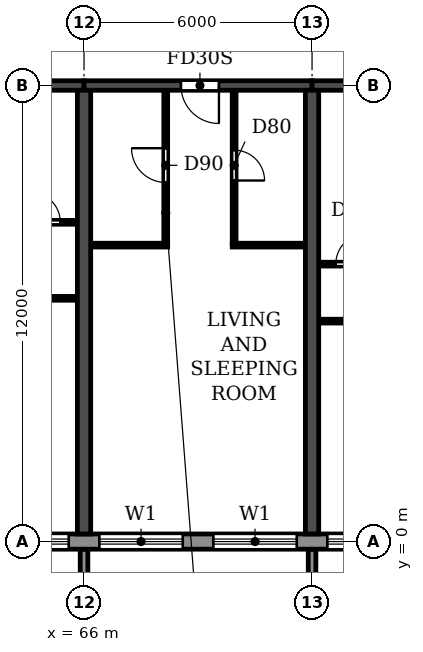
"""IFC4 building model, lengths in metres.
Left out: names, types, materials, properties, quantities, classifications, styles, units other than length and angle.
Written with IfcOpenShell. Run it as: python <this file> out.ifc"""

import sys

from ifc_helpers import new_model, si_unit, direction, frame, frame_2d, origin, place, context, subcontext, project, spatial, polyline, rectangle, outline, extrude, source, transform, mapped, element, fill, save


model = new_model("IFC4")
c1 = context("Model", 3, precision=1e-05, world=origin(), true_north=direction((0.0, 1.0)))
c2 = subcontext(c1, "Body", "Model", "MODEL_VIEW")
j1 = project(units=[si_unit("LENGTHUNIT", "METRE"), si_unit("PLANEANGLEUNIT", "RADIAN")], contexts=[c1])
p1 = place(None, origin())
s1 = spatial("IfcSite", under=j1, at=p1, CompositionType="ELEMENT")
p2 = place(p1, origin())
s2 = spatial("IfcBuilding", under=s1, at=p2, CompositionType="ELEMENT")
p3 = place(p2, frame((0.0, 0.0, 72.9)))
s3 = spatial("IfcBuildingStorey", under=s2, at=p3, CompositionType="ELEMENT", Elevation=72.9)
for number, where, z_axis, x_axis in (
    (1, (66.0, 0.2, 0.0), (0.0, 0.0, 1.0), (0.0, 1.0, 0.0)),
    (2, (72.0, 0.2, 0.0), (0.0, 0.0, 1.0), (0.0, 1.0, 0.0)),
):
    element("IfcWall", number, at=place(p3, frame(where, z_axis=z_axis, x_axis=x_axis)), inside=s3, PredefinedType="SHEAR", context=c2, shape_type="SweptSolid", body=[
        extrude(rectangle(XDim=11.675, YDim=0.35, at=frame_2d((5.837, 0.0))), origin(), (0.0, 0.0, 1.0), 3.06),
    ])
p4 = place(p3, frame((60.0, 12.0, 0.0), z_axis=(0.0, 0.0, 1.0), x_axis=(1.0, 0.0, 0.0)))
e3 = element("IfcWall", 3, at=p4, inside=s3, PredefinedType="SHEAR", context=c2, shape_type="SweptSolid", body=[
    extrude(rectangle(XDim=6.0, YDim=0.25, at=frame_2d((3.0, 0.0))), origin(), (0.0, 0.0, 1.0), 2.46),
])
p5 = place(p4, frame((2.55, 0.0, 0.0)))
e4 = element("IfcOpeningElement", 4, at=p5, cuts=e3, PredefinedType="OPENING", context=c2, shape_type="SweptSolid", body=[
    extrude(rectangle(XDim=1.0, YDim=2.1, at=frame_2d((0.5, 1.05))), frame((0.0, 0.135, 0.0), z_axis=(0.0, -1.0, 0.0), x_axis=(1.0, 0.0, 0.0)), (0.0, 0.0, 1.0), 0.27),
])
p6 = place(p3, frame((66.0, 12.0, 0.0), z_axis=(0.0, 0.0, 1.0), x_axis=(1.0, 0.0, 0.0)))
e5 = element("IfcWall", 5, at=p6, inside=s3, PredefinedType="SHEAR", context=c2, shape_type="SweptSolid", body=[
    extrude(rectangle(XDim=6.0, YDim=0.25, at=frame_2d((3.0, 0.0))), origin(), (0.0, 0.0, 1.0), 2.46),
])
p7 = place(p6, frame((2.55, 0.0, 0.0)))
e6 = element("IfcOpeningElement", 6, at=p7, cuts=e5, PredefinedType="OPENING", context=c2, shape_type="SweptSolid", body=[
    extrude(rectangle(XDim=1.0, YDim=2.1, at=frame_2d((0.5, 1.05))), frame((0.0, 0.135, 0.0), z_axis=(0.0, -1.0, 0.0), x_axis=(1.0, 0.0, 0.0)), (0.0, 0.0, 1.0), 0.27),
])
p8 = place(p3, frame((72.0, 12.0, 0.0), z_axis=(0.0, 0.0, 1.0), x_axis=(1.0, 0.0, 0.0)))
e7 = element("IfcWall", 7, at=p8, inside=s3, PredefinedType="SHEAR", context=c2, shape_type="SweptSolid", body=[
    extrude(rectangle(XDim=6.0, YDim=0.25, at=frame_2d((3.0, 0.0))), origin(), (0.0, 0.0, 1.0), 2.46),
])
p9 = place(p8, frame((2.45, 0.0, 0.0)))
e8 = element("IfcOpeningElement", 8, at=p9, cuts=e7, PredefinedType="OPENING", context=c2, shape_type="SweptSolid", body=[
    extrude(rectangle(XDim=1.0, YDim=2.1, at=frame_2d((0.5, 1.05))), frame((0.0, 0.135, 0.0), z_axis=(0.0, -1.0, 0.0), x_axis=(1.0, 0.0, 0.0)), (0.0, 0.0, 1.0), 0.27),
])
p10 = place(p3, frame((10.683, 0.0, 0.0), z_axis=(0.0, 0.0, 1.0), x_axis=(1.0, 0.0, 0.0)))
e9 = element("IfcWall", 9, at=p10, inside=s3, PredefinedType="STANDARD", context=c2, shape_type="SweptSolid", body=[
    extrude(rectangle(XDim=80.634, YDim=0.4, at=frame_2d((40.317, 0.0))), origin(), (0.0, 0.0, 1.0), 3.06),
])
p11 = place(p10, frame((1.717, 0.0, 0.9)))
e10 = element("IfcOpeningElement", 10, at=p11, cuts=e9, PredefinedType="OPENING", context=c2, shape_type="SweptSolid", body=[
    extrude(rectangle(XDim=2.2, YDim=1.5, at=frame_2d((1.1, 0.75))), frame((0.0, 0.21, 0.0), z_axis=(0.0, -1.0, 0.0), x_axis=(1.0, 0.0, 0.0)), (0.0, 0.0, 1.0), 0.42),
])
p12 = place(p10, frame((4.917, 0.0, 0.0)))
e11 = element("IfcOpeningElement", 11, at=p12, cuts=e9, PredefinedType="OPENING", context=c2, shape_type="SweptSolid", body=[
    extrude(rectangle(XDim=1.8, YDim=2.4, at=frame_2d((0.9, 1.2))), frame((0.0, 0.21, 0.0), z_axis=(0.0, -1.0, 0.0), x_axis=(1.0, 0.0, 0.0)), (0.0, 0.0, 1.0), 0.42),
])
p13 = place(p10, frame((7.717, 0.0, 0.9)))
e12 = element("IfcOpeningElement", 12, at=p13, cuts=e9, PredefinedType="OPENING", context=c2, shape_type="SweptSolid", body=[
    extrude(rectangle(XDim=2.2, YDim=1.5, at=frame_2d((1.1, 0.75))), frame((0.0, 0.21, 0.0), z_axis=(0.0, -1.0, 0.0), x_axis=(1.0, 0.0, 0.0)), (0.0, 0.0, 1.0), 0.42),
])
p14 = place(p10, frame((10.717, 0.0, 0.9)))
e13 = element("IfcOpeningElement", 13, at=p14, cuts=e9, PredefinedType="OPENING", context=c2, shape_type="SweptSolid", body=[
    extrude(rectangle(XDim=2.2, YDim=1.5, at=frame_2d((1.1, 0.75))), frame((0.0, 0.21, 0.0), z_axis=(0.0, -1.0, 0.0), x_axis=(1.0, 0.0, 0.0)), (0.0, 0.0, 1.0), 0.42),
])
p15 = place(p10, frame((13.717, 0.0, 0.9)))
e14 = element("IfcOpeningElement", 14, at=p15, cuts=e9, PredefinedType="OPENING", context=c2, shape_type="SweptSolid", body=[
    extrude(rectangle(XDim=2.2, YDim=1.5, at=frame_2d((1.1, 0.75))), frame((0.0, 0.21, 0.0), z_axis=(0.0, -1.0, 0.0), x_axis=(1.0, 0.0, 0.0)), (0.0, 0.0, 1.0), 0.42),
])
p16 = place(p10, frame((16.917, 0.0, 0.0)))
e15 = element("IfcOpeningElement", 15, at=p16, cuts=e9, PredefinedType="OPENING", context=c2, shape_type="SweptSolid", body=[
    extrude(rectangle(XDim=1.8, YDim=2.4, at=frame_2d((0.9, 1.2))), frame((0.0, 0.21, 0.0), z_axis=(0.0, -1.0, 0.0), x_axis=(1.0, 0.0, 0.0)), (0.0, 0.0, 1.0), 0.42),
])
p17 = place(p10, frame((19.717, 0.0, 0.9)))
e16 = element("IfcOpeningElement", 16, at=p17, cuts=e9, PredefinedType="OPENING", context=c2, shape_type="SweptSolid", body=[
    extrude(rectangle(XDim=2.2, YDim=1.5, at=frame_2d((1.1, 0.75))), frame((0.0, 0.21, 0.0), z_axis=(0.0, -1.0, 0.0), x_axis=(1.0, 0.0, 0.0)), (0.0, 0.0, 1.0), 0.42),
])
p18 = place(p10, frame((22.717, 0.0, 0.9)))
e17 = element("IfcOpeningElement", 17, at=p18, cuts=e9, PredefinedType="OPENING", context=c2, shape_type="SweptSolid", body=[
    extrude(rectangle(XDim=2.2, YDim=1.5, at=frame_2d((1.1, 0.75))), frame((0.0, 0.21, 0.0), z_axis=(0.0, -1.0, 0.0), x_axis=(1.0, 0.0, 0.0)), (0.0, 0.0, 1.0), 0.42),
])
p19 = place(p10, frame((25.917, 0.0, 0.0)))
e18 = element("IfcOpeningElement", 18, at=p19, cuts=e9, PredefinedType="OPENING", context=c2, shape_type="SweptSolid", body=[
    extrude(rectangle(XDim=1.8, YDim=2.4, at=frame_2d((0.9, 1.2))), frame((0.0, 0.21, 0.0), z_axis=(0.0, -1.0, 0.0), x_axis=(1.0, 0.0, 0.0)), (0.0, 0.0, 1.0), 0.42),
])
p20 = place(p10, frame((28.717, 0.0, 0.9)))
e19 = element("IfcOpeningElement", 19, at=p20, cuts=e9, PredefinedType="OPENING", context=c2, shape_type="SweptSolid", body=[
    extrude(rectangle(XDim=2.2, YDim=1.5, at=frame_2d((1.1, 0.75))), frame((0.0, 0.21, 0.0), z_axis=(0.0, -1.0, 0.0), x_axis=(1.0, 0.0, 0.0)), (0.0, 0.0, 1.0), 0.42),
])
p21 = place(p10, frame((31.717, 0.0, 0.9)))
e20 = element("IfcOpeningElement", 20, at=p21, cuts=e9, PredefinedType="OPENING", context=c2, shape_type="SweptSolid", body=[
    extrude(rectangle(XDim=2.2, YDim=1.5, at=frame_2d((1.1, 0.75))), frame((0.0, 0.21, 0.0), z_axis=(0.0, -1.0, 0.0), x_axis=(1.0, 0.0, 0.0)), (0.0, 0.0, 1.0), 0.42),
])
p22 = place(p10, frame((34.717, 0.0, 0.9)))
e21 = element("IfcOpeningElement", 21, at=p22, cuts=e9, PredefinedType="OPENING", context=c2, shape_type="SweptSolid", body=[
    extrude(rectangle(XDim=2.2, YDim=1.5, at=frame_2d((1.1, 0.75))), frame((0.0, 0.21, 0.0), z_axis=(0.0, -1.0, 0.0), x_axis=(1.0, 0.0, 0.0)), (0.0, 0.0, 1.0), 0.42),
])
p23 = place(p10, frame((37.917, 0.0, 0.0)))
e22 = element("IfcOpeningElement", 22, at=p23, cuts=e9, PredefinedType="OPENING", context=c2, shape_type="SweptSolid", body=[
    extrude(rectangle(XDim=1.8, YDim=2.4, at=frame_2d((0.9, 1.2))), frame((0.0, 0.21, 0.0), z_axis=(0.0, -1.0, 0.0), x_axis=(1.0, 0.0, 0.0)), (0.0, 0.0, 1.0), 0.42),
])
p24 = place(p10, frame((40.717, 0.0, 0.9)))
e23 = element("IfcOpeningElement", 23, at=p24, cuts=e9, PredefinedType="OPENING", context=c2, shape_type="SweptSolid", body=[
    extrude(rectangle(XDim=2.2, YDim=1.5, at=frame_2d((1.1, 0.75))), frame((0.0, 0.21, 0.0), z_axis=(0.0, -1.0, 0.0), x_axis=(1.0, 0.0, 0.0)), (0.0, 0.0, 1.0), 0.42),
])
p25 = place(p10, frame((43.717, 0.0, 0.9)))
e24 = element("IfcOpeningElement", 24, at=p25, cuts=e9, PredefinedType="OPENING", context=c2, shape_type="SweptSolid", body=[
    extrude(rectangle(XDim=2.2, YDim=1.5, at=frame_2d((1.1, 0.75))), frame((0.0, 0.21, 0.0), z_axis=(0.0, -1.0, 0.0), x_axis=(1.0, 0.0, 0.0)), (0.0, 0.0, 1.0), 0.42),
])
p26 = place(p10, frame((46.717, 0.0, 0.9)))
e25 = element("IfcOpeningElement", 25, at=p26, cuts=e9, PredefinedType="OPENING", context=c2, shape_type="SweptSolid", body=[
    extrude(rectangle(XDim=2.2, YDim=1.5, at=frame_2d((1.1, 0.75))), frame((0.0, 0.21, 0.0), z_axis=(0.0, -1.0, 0.0), x_axis=(1.0, 0.0, 0.0)), (0.0, 0.0, 1.0), 0.42),
])
p27 = place(p10, frame((49.917, 0.0, 0.0)))
e26 = element("IfcOpeningElement", 26, at=p27, cuts=e9, PredefinedType="OPENING", context=c2, shape_type="SweptSolid", body=[
    extrude(rectangle(XDim=1.8, YDim=2.4, at=frame_2d((0.9, 1.2))), frame((0.0, 0.21, 0.0), z_axis=(0.0, -1.0, 0.0), x_axis=(1.0, 0.0, 0.0)), (0.0, 0.0, 1.0), 0.42),
])
p28 = place(p10, frame((52.717, 0.0, 0.9)))
e27 = element("IfcOpeningElement", 27, at=p28, cuts=e9, PredefinedType="OPENING", context=c2, shape_type="SweptSolid", body=[
    extrude(rectangle(XDim=2.2, YDim=1.5, at=frame_2d((1.1, 0.75))), frame((0.0, 0.21, 0.0), z_axis=(0.0, -1.0, 0.0), x_axis=(1.0, 0.0, 0.0)), (0.0, 0.0, 1.0), 0.42),
])
p29 = place(p10, frame((55.717, 0.0, 0.9)))
e28 = element("IfcOpeningElement", 28, at=p29, cuts=e9, PredefinedType="OPENING", context=c2, shape_type="SweptSolid", body=[
    extrude(rectangle(XDim=2.2, YDim=1.5, at=frame_2d((1.1, 0.75))), frame((0.0, 0.21, 0.0), z_axis=(0.0, -1.0, 0.0), x_axis=(1.0, 0.0, 0.0)), (0.0, 0.0, 1.0), 0.42),
])
p30 = place(p10, frame((58.717, 0.0, 0.9)))
e29 = element("IfcOpeningElement", 29, at=p30, cuts=e9, PredefinedType="OPENING", context=c2, shape_type="SweptSolid", body=[
    extrude(rectangle(XDim=2.2, YDim=1.5, at=frame_2d((1.1, 0.75))), frame((0.0, 0.21, 0.0), z_axis=(0.0, -1.0, 0.0), x_axis=(1.0, 0.0, 0.0)), (0.0, 0.0, 1.0), 0.42),
])
p31 = place(p10, frame((61.717, 0.0, 0.9)))
e30 = element("IfcOpeningElement", 30, at=p31, cuts=e9, PredefinedType="OPENING", context=c2, shape_type="SweptSolid", body=[
    extrude(rectangle(XDim=2.2, YDim=1.5, at=frame_2d((1.1, 0.75))), frame((0.0, 0.21, 0.0), z_axis=(0.0, -1.0, 0.0), x_axis=(1.0, 0.0, 0.0)), (0.0, 0.0, 1.0), 0.42),
])
p32 = place(p10, frame((64.917, 0.0, 0.0)))
e31 = element("IfcOpeningElement", 31, at=p32, cuts=e9, PredefinedType="OPENING", context=c2, shape_type="SweptSolid", body=[
    extrude(rectangle(XDim=1.8, YDim=2.4, at=frame_2d((0.9, 1.2))), frame((0.0, 0.21, 0.0), z_axis=(0.0, -1.0, 0.0), x_axis=(1.0, 0.0, 0.0)), (0.0, 0.0, 1.0), 0.42),
])
p33 = place(p10, frame((67.717, 0.0, 0.9)))
e32 = element("IfcOpeningElement", 32, at=p33, cuts=e9, PredefinedType="OPENING", context=c2, shape_type="SweptSolid", body=[
    extrude(rectangle(XDim=2.2, YDim=1.5, at=frame_2d((1.1, 0.75))), frame((0.0, 0.21, 0.0), z_axis=(0.0, -1.0, 0.0), x_axis=(1.0, 0.0, 0.0)), (0.0, 0.0, 1.0), 0.42),
])
p34 = place(p10, frame((70.717, 0.0, 0.9)))
e33 = element("IfcOpeningElement", 33, at=p34, cuts=e9, PredefinedType="OPENING", context=c2, shape_type="SweptSolid", body=[
    extrude(rectangle(XDim=2.2, YDim=1.5, at=frame_2d((1.1, 0.75))), frame((0.0, 0.21, 0.0), z_axis=(0.0, -1.0, 0.0), x_axis=(1.0, 0.0, 0.0)), (0.0, 0.0, 1.0), 0.42),
])
p35 = place(p10, frame((73.917, 0.0, 0.0)))
e34 = element("IfcOpeningElement", 34, at=p35, cuts=e9, PredefinedType="OPENING", context=c2, shape_type="SweptSolid", body=[
    extrude(rectangle(XDim=1.8, YDim=2.4, at=frame_2d((0.9, 1.2))), frame((0.0, 0.21, 0.0), z_axis=(0.0, -1.0, 0.0), x_axis=(1.0, 0.0, 0.0)), (0.0, 0.0, 1.0), 0.42),
])
p36 = place(p10, frame((76.717, 0.0, 0.9)))
e35 = element("IfcOpeningElement", 35, at=p36, cuts=e9, PredefinedType="OPENING", context=c2, shape_type="SweptSolid", body=[
    extrude(rectangle(XDim=2.2, YDim=1.5, at=frame_2d((1.1, 0.75))), frame((0.0, 0.21, 0.0), z_axis=(0.0, -1.0, 0.0), x_axis=(1.0, 0.0, 0.0)), (0.0, 0.0, 1.0), 0.42),
])
m1 = source(origin(), c2, "Body", "SweptSolid", [
    extrude(outline(polyline([(0.0, 0.0), (0.2, 0.0), (0.2, 1.65), (0.0, 1.65), (0.0, 0.0)])), origin(), (0.0, 0.0, 1.0), 3.1),
])
for number, where in (
    (36, (65.9, -1.85, 0.0)),
    (37, (71.9, -1.85, 0.0)),
):
    element("IfcWall", number, at=place(p3, frame(where)), inside=s3, PredefinedType="STANDARD", context=c2, shape_type="MappedRepresentation", body=[
        mapped(m1, transform((0.0, 0.0, 0.0))),
    ])
p37 = place(p3, frame((72.185, 5.8, 0.0), z_axis=(0.0, 0.0, 1.0), x_axis=(1.0, 0.0, 0.0)))
e38 = element("IfcWall", 38, at=p37, inside=s3, PredefinedType="PARTITIONING", context=c2, shape_type="SweptSolid", body=[
    extrude(rectangle(XDim=2.865, YDim=0.1, at=frame_2d((1.433, 0.0))), origin(), (0.0, 0.0, 1.0), 3.06),
])
p38 = place(p37, frame((1.415, 0.0, 0.0)))
e39 = element("IfcOpeningElement", 39, at=p38, cuts=e38, PredefinedType="OPENING", context=c2, shape_type="SweptSolid", body=[
    extrude(rectangle(XDim=0.9, YDim=2.1, at=frame_2d((0.45, 1.05))), frame((0.0, 0.06, 0.0), z_axis=(0.0, -1.0, 0.0), x_axis=(1.0, 0.0, 0.0)), (0.0, 0.0, 1.0), 0.12),
])
p39 = place(p3, frame((62.95, 6.4, 0.0), z_axis=(0.0, 0.0, 1.0), x_axis=(1.0, 0.0, 0.0)))
e40 = element("IfcWall", 40, at=p39, inside=s3, PredefinedType="PARTITIONING", context=c2, shape_type="SweptSolid", body=[
    extrude(rectangle(XDim=2.865, YDim=0.1, at=frame_2d((1.433, 0.0))), origin(), (0.0, 0.0, 1.0), 3.06),
])
p40 = place(p39, frame((0.55, 0.0, 0.0)))
e41 = element("IfcOpeningElement", 41, at=p40, cuts=e40, PredefinedType="OPENING", context=c2, shape_type="SweptSolid", body=[
    extrude(rectangle(XDim=0.9, YDim=2.1, at=frame_2d((0.45, 1.05))), frame((0.0, 0.06, 0.0), z_axis=(0.0, -1.0, 0.0), x_axis=(1.0, 0.0, 0.0)), (0.0, 0.0, 1.0), 0.12),
])
p41 = place(p3, frame((72.185, 7.3, 0.0), z_axis=(0.0, 0.0, 1.0), x_axis=(1.0, 0.0, 0.0)))
e42 = element("IfcWall", 42, at=p41, inside=s3, PredefinedType="PARTITIONING", context=c2, shape_type="SweptSolid", body=[
    extrude(rectangle(XDim=1.915, YDim=0.1, at=frame_2d((0.958, 0.0))), origin(), (0.0, 0.0, 1.0), 3.06),
])
p42 = place(p41, frame((0.44, 0.0, 0.0)))
e43 = element("IfcOpeningElement", 43, at=p42, cuts=e42, PredefinedType="OPENING", context=c2, shape_type="SweptSolid", body=[
    extrude(rectangle(XDim=0.8, YDim=2.1, at=frame_2d((0.4, 1.05))), frame((0.0, 0.06, 0.0), z_axis=(0.0, -1.0, 0.0), x_axis=(1.0, 0.0, 0.0)), (0.0, 0.0, 1.0), 0.12),
])
p43 = place(p3, frame((66.185, 7.8, 0.0), z_axis=(0.0, 0.0, 1.0), x_axis=(1.0, 0.0, 0.0)))
e44 = element("IfcWall", 44, at=p43, inside=s3, PredefinedType="PARTITIONING", context=c2, shape_type="SweptSolid", body=[
    extrude(rectangle(XDim=2.015, YDim=0.1, at=frame_2d((1.007, 0.0))), origin(), (0.0, 0.0, 1.0), 3.06),
])
p44 = place(p3, frame((69.9, 7.8, 0.0), z_axis=(0.0, 0.0, 1.0), x_axis=(1.0, 0.0, 0.0)))
e45 = element("IfcWall", 45, at=p44, inside=s3, PredefinedType="PARTITIONING", context=c2, shape_type="SweptSolid", body=[
    extrude(rectangle(XDim=1.915, YDim=0.1, at=frame_2d((0.958, 0.0))), origin(), (0.0, 0.0, 1.0), 3.06),
])
p45 = place(p3, frame((63.9, 8.4, 0.0), z_axis=(0.0, 0.0, 1.0), x_axis=(1.0, 0.0, 0.0)))
e46 = element("IfcWall", 46, at=p45, inside=s3, PredefinedType="PARTITIONING", context=c2, shape_type="SweptSolid", body=[
    extrude(rectangle(XDim=1.915, YDim=0.1, at=frame_2d((0.958, 0.0))), origin(), (0.0, 0.0, 1.0), 3.06),
])
p46 = place(p45, frame((0.675, 0.0, 0.0)))
e47 = element("IfcOpeningElement", 47, at=p46, cuts=e46, PredefinedType="OPENING", context=c2, shape_type="SweptSolid", body=[
    extrude(rectangle(XDim=0.8, YDim=2.1, at=frame_2d((0.4, 1.05))), frame((0.0, 0.06, 0.0), z_axis=(0.0, -1.0, 0.0), x_axis=(1.0, 0.0, 0.0)), (0.0, 0.0, 1.0), 0.12),
])
p47 = place(p3, frame((68.15, 7.85, 0.0), z_axis=(0.0, 0.0, 1.0), x_axis=(0.0, 1.0, 0.0)))
e48 = element("IfcWall", 48, at=p47, inside=s3, PredefinedType="PARTITIONING", context=c2, shape_type="SweptSolid", body=[
    extrude(rectangle(XDim=4.015, YDim=0.1, at=frame_2d((2.007, 0.0))), origin(), (0.0, 0.0, 1.0), 3.06),
])
p48 = place(p47, frame((1.6, 0.0, 0.0)))
e49 = element("IfcOpeningElement", 49, at=p48, cuts=e48, PredefinedType="OPENING", context=c2, shape_type="SweptSolid", body=[
    extrude(rectangle(XDim=0.9, YDim=2.1, at=frame_2d((0.45, 1.05))), frame((0.0, 0.06, 0.0), z_axis=(0.0, -1.0, 0.0), x_axis=(1.0, 0.0, 0.0)), (0.0, 0.0, 1.0), 0.12),
])
p49 = place(p3, frame((69.95, 7.85, 0.0), z_axis=(0.0, 0.0, 1.0), x_axis=(0.0, 1.0, 0.0)))
e50 = element("IfcWall", 50, at=p49, inside=s3, PredefinedType="PARTITIONING", context=c2, shape_type="SweptSolid", body=[
    extrude(rectangle(XDim=4.015, YDim=0.1, at=frame_2d((2.007, 0.0))), origin(), (0.0, 0.0, 1.0), 3.06),
])
p50 = place(p49, frame((1.65, 0.0, 0.0)))
e51 = element("IfcOpeningElement", 51, at=p50, cuts=e50, PredefinedType="OPENING", context=c2, shape_type="SweptSolid", body=[
    extrude(rectangle(XDim=0.8, YDim=2.1, at=frame_2d((0.4, 1.05))), frame((0.0, 0.06, 0.0), z_axis=(0.0, -1.0, 0.0), x_axis=(1.0, 0.0, 0.0)), (0.0, 0.0, 1.0), 0.12),
])
p51 = place(p28, origin())
e52 = element("IfcWindow", 52, at=p51, inside=s3, PartitioningType="DOUBLE_PANEL_HORIZONTAL", PredefinedType="WINDOW", context=c2, shape_type="SweptSolid", body=[
    extrude(rectangle(XDim=2.2, YDim=1.5, at=frame_2d((1.1, 0.75))), frame((0.0, 0.03, 0.0), z_axis=(0.0, -1.0, 0.0), x_axis=(1.0, 0.0, 0.0)), (0.0, 0.0, 1.0), 0.06),
])
fill(e27, e52)
p52 = place(p29, origin())
e53 = element("IfcWindow", 53, at=p52, inside=s3, PartitioningType="DOUBLE_PANEL_HORIZONTAL", PredefinedType="WINDOW", context=c2, shape_type="SweptSolid", body=[
    extrude(rectangle(XDim=2.2, YDim=1.5, at=frame_2d((1.1, 0.75))), frame((0.0, 0.03, 0.0), z_axis=(0.0, -1.0, 0.0), x_axis=(1.0, 0.0, 0.0)), (0.0, 0.0, 1.0), 0.06),
])
fill(e28, e53)
p53 = place(p30, origin())
e54 = element("IfcWindow", 54, at=p53, inside=s3, PartitioningType="DOUBLE_PANEL_HORIZONTAL", PredefinedType="WINDOW", context=c2, shape_type="SweptSolid", body=[
    extrude(rectangle(XDim=2.2, YDim=1.5, at=frame_2d((1.1, 0.75))), frame((0.0, 0.03, 0.0), z_axis=(0.0, -1.0, 0.0), x_axis=(1.0, 0.0, 0.0)), (0.0, 0.0, 1.0), 0.06),
])
fill(e29, e54)
p54 = place(p31, origin())
e55 = element("IfcWindow", 55, at=p54, inside=s3, PartitioningType="DOUBLE_PANEL_HORIZONTAL", PredefinedType="WINDOW", context=c2, shape_type="SweptSolid", body=[
    extrude(rectangle(XDim=2.2, YDim=1.5, at=frame_2d((1.1, 0.75))), frame((0.0, 0.03, 0.0), z_axis=(0.0, -1.0, 0.0), x_axis=(1.0, 0.0, 0.0)), (0.0, 0.0, 1.0), 0.06),
])
fill(e30, e55)
p55 = place(p46, origin())
e56 = element("IfcDoor", 56, at=p55, inside=s3, OperationType="SINGLE_SWING_LEFT", PredefinedType="DOOR", context=c2, shape_type="SweptSolid", body=[
    extrude(rectangle(XDim=0.8, YDim=2.1, at=frame_2d((0.4, 1.05))), frame((0.0, 0.025, 0.0), z_axis=(0.0, -1.0, 0.0), x_axis=(1.0, 0.0, 0.0)), (0.0, 0.0, 1.0), 0.05),
])
fill(e47, e56)
p56 = place(p48, origin())
e57 = element("IfcDoor", 57, at=p56, inside=s3, OperationType="SINGLE_SWING_RIGHT", PredefinedType="DOOR", context=c2, shape_type="SweptSolid", body=[
    extrude(rectangle(XDim=0.9, YDim=2.1, at=frame_2d((0.45, 1.05))), frame((0.0, 0.025, 0.0), z_axis=(0.0, -1.0, 0.0), x_axis=(1.0, 0.0, 0.0)), (0.0, 0.0, 1.0), 0.05),
])
fill(e49, e57)
p57 = place(p7, frame((1.0, 0.0, 0.0), z_axis=(0.0, 0.0, 1.0), x_axis=(-1.0, 0.0, 0.0)))
e58 = element("IfcDoor", 58, at=p57, inside=s3, OperationType="SINGLE_SWING_LEFT", PredefinedType="DOOR", context=c2, shape_type="SweptSolid", body=[
    extrude(rectangle(XDim=1.0, YDim=2.1, at=frame_2d((0.5, 1.05))), frame((0.0, 0.025, 0.0), z_axis=(0.0, -1.0, 0.0), x_axis=(1.0, 0.0, 0.0)), (0.0, 0.0, 1.0), 0.05),
])
fill(e6, e58)
p58 = place(p50, frame((0.8, 0.0, 0.0), z_axis=(0.0, 0.0, 1.0), x_axis=(-1.0, 0.0, 0.0)))
e59 = element("IfcDoor", 59, at=p58, inside=s3, OperationType="SINGLE_SWING_RIGHT", PredefinedType="DOOR", context=c2, shape_type="SweptSolid", body=[
    extrude(rectangle(XDim=0.8, YDim=2.1, at=frame_2d((0.4, 1.05))), frame((0.0, 0.025, 0.0), z_axis=(0.0, -1.0, 0.0), x_axis=(1.0, 0.0, 0.0)), (0.0, 0.0, 1.0), 0.05),
])
fill(e51, e59)
p59 = place(p42, origin())
e60 = element("IfcDoor", 60, at=p59, inside=s3, OperationType="SINGLE_SWING_RIGHT", PredefinedType="DOOR", context=c2, shape_type="SweptSolid", body=[
    extrude(rectangle(XDim=0.8, YDim=2.1, at=frame_2d((0.4, 1.05))), frame((0.0, 0.025, 0.0), z_axis=(0.0, -1.0, 0.0), x_axis=(1.0, 0.0, 0.0)), (0.0, 0.0, 1.0), 0.05),
])
fill(e43, e60)
save(model, sys.argv[1])
